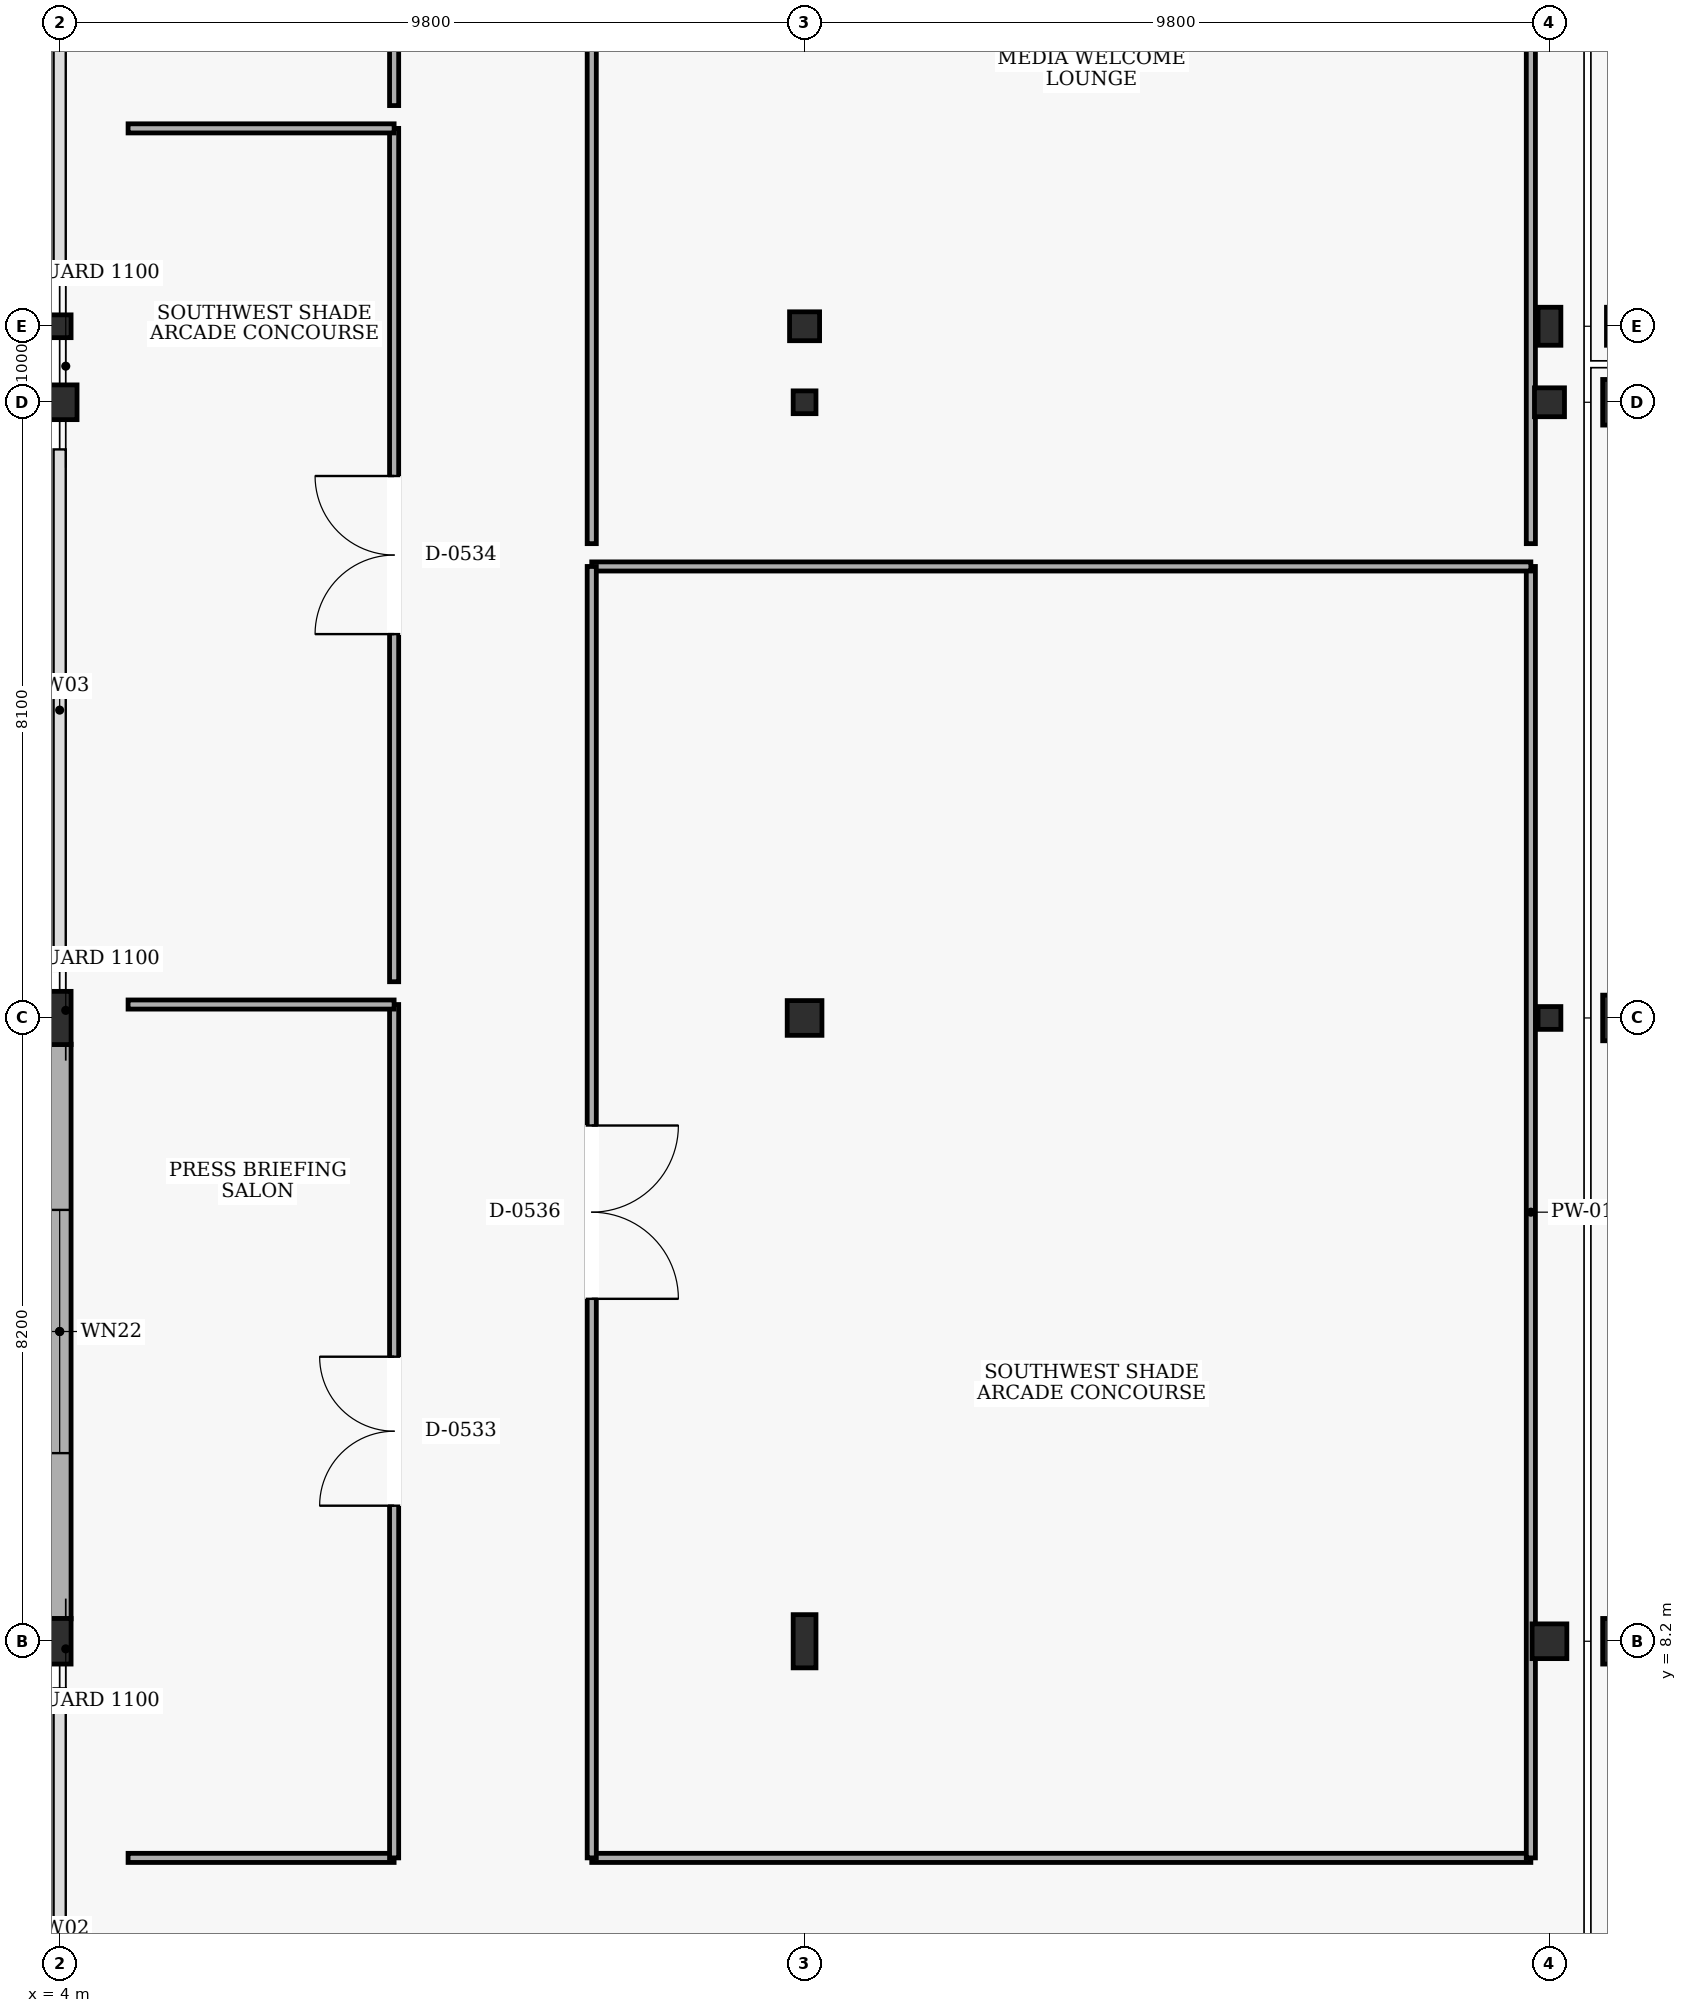
"""IFC4 building model, lengths in metres.
Left out: names, types, materials, properties, quantities, classifications, styles, units other than length and angle.
Written with IfcOpenShell. Run it as: python <this file> out.ifc"""

import sys

from ifc_helpers import new_model, si_unit, direction, frame, frame_2d, origin, origin_2d, place, context, subcontext, project, spatial, rectangle, hollow_rectangle, hollow_circle, i_section, extrude, element, fill, save


model = new_model("IFC4")
c1 = context("Model", 3, precision=1e-05, world=origin(), true_north=direction((0.0, 1.0)))
c2 = subcontext(c1, "Body", "Model", "MODEL_VIEW")
j1 = project(units=[si_unit("LENGTHUNIT", "METRE"), si_unit("PLANEANGLEUNIT", "RADIAN")], contexts=[c1])
p1 = place(None, origin())
s1 = spatial("IfcSite", under=j1, at=p1, CompositionType="ELEMENT")
p2 = place(p1, origin())
s2 = spatial("IfcBuilding", under=s1, at=p2, CompositionType="ELEMENT")
p3 = place(p2, frame((0.0, 0.0, 5.4)))
s3 = spatial("IfcBuildingStorey", under=s2, at=p3, CompositionType="ELEMENT", Elevation=5.4)
p4 = place(p3, frame((4.0, 8.2, 0.0), z_axis=(0.0, 0.0, 1.0), x_axis=(1.0, 0.0, 0.0)))
e1 = element("IfcColumn", 1, at=p4, inside=s3, PredefinedType="COLUMN", context=c2, shape_type="SweptSolid", body=[
    extrude(i_section(OverallWidth=0.3, OverallDepth=0.6, WebThickness=0.015, FlangeThickness=0.03, at=origin_2d()), origin(), (0.0, 0.0, 1.0), 4.8),
])
p5 = place(p3, frame((4.0, 16.4, 0.0), z_axis=(0.0, 0.0, 1.0), x_axis=(1.0, 0.0, 0.0)))
e2 = element("IfcColumn", 2, at=p5, inside=s3, PredefinedType="COLUMN", context=c2, shape_type="SweptSolid", body=[
    extrude(i_section(OverallWidth=0.3, OverallDepth=0.7, WebThickness=0.017, FlangeThickness=0.032, at=origin_2d()), origin(), (0.0, 0.0, 1.0), 4.8),
])
p6 = place(p3, frame((4.0, 24.5, 0.0), z_axis=(0.0, 0.0, 1.0), x_axis=(1.0, 0.0, 0.0)))
e3 = element("IfcColumn", 3, at=p6, inside=s3, PredefinedType="COLUMN", context=c2, shape_type="SweptSolid", body=[
    extrude(hollow_circle(Radius=0.229, WallThickness=0.02, at=origin_2d()), origin(), (0.0, 0.0, 1.0), 4.8),
])
p7 = place(p3, frame((4.0, 25.5, 0.0), z_axis=(0.0, 0.0, 1.0), x_axis=(1.0, 0.0, 0.0)))
e4 = element("IfcColumn", 4, at=p7, inside=s3, PredefinedType="COLUMN", context=c2, shape_type="SweptSolid", body=[
    extrude(hollow_rectangle(XDim=0.3, YDim=0.3, WallThickness=0.016, at=origin_2d()), origin(), (0.0, 0.0, 1.0), 4.8),
])
p8 = place(p3, frame((13.8, 8.2, 0.0), z_axis=(0.0, 0.0, 1.0), x_axis=(1.0, 0.0, 0.0)))
e5 = element("IfcColumn", 5, at=p8, inside=s3, PredefinedType="COLUMN", context=c2, shape_type="SweptSolid", body=[
    extrude(i_section(OverallWidth=0.3, OverallDepth=0.7, WebThickness=0.017, FlangeThickness=0.032, at=origin_2d()), origin(), (0.0, 0.0, 1.0), 4.8),
])
p9 = place(p3, frame((13.8, 16.4, 0.0), z_axis=(0.0, 0.0, 1.0), x_axis=(1.0, 0.0, 0.0)))
e6 = element("IfcColumn", 6, at=p9, inside=s3, PredefinedType="COLUMN", context=c2, shape_type="SweptSolid", body=[
    extrude(hollow_circle(Radius=0.229, WallThickness=0.02, at=origin_2d()), origin(), (0.0, 0.0, 1.0), 4.8),
])
p10 = place(p3, frame((13.8, 24.5, 0.0), z_axis=(0.0, 0.0, 1.0), x_axis=(1.0, 0.0, 0.0)))
e7 = element("IfcColumn", 7, at=p10, inside=s3, PredefinedType="COLUMN", context=c2, shape_type="SweptSolid", body=[
    extrude(hollow_rectangle(XDim=0.3, YDim=0.3, WallThickness=0.016, at=origin_2d()), origin(), (0.0, 0.0, 1.0), 4.8),
])
p11 = place(p3, frame((13.8, 25.5, 0.0), z_axis=(0.0, 0.0, 1.0), x_axis=(1.0, 0.0, 0.0)))
e8 = element("IfcColumn", 8, at=p11, inside=s3, PredefinedType="COLUMN", context=c2, shape_type="SweptSolid", body=[
    extrude(i_section(OverallWidth=0.395, OverallDepth=0.38, WebThickness=0.019, FlangeThickness=0.03, at=origin_2d()), origin(), (0.0, 0.0, 1.0), 4.8),
])
p12 = place(p3, frame((23.6, 8.2, 0.0), z_axis=(0.0, 0.0, 1.0), x_axis=(1.0, 0.0, 0.0)))
e9 = element("IfcColumn", 9, at=p12, inside=s3, PredefinedType="COLUMN", context=c2, shape_type="SweptSolid", body=[
    extrude(hollow_circle(Radius=0.229, WallThickness=0.02, at=origin_2d()), origin(), (0.0, 0.0, 1.0), 4.8),
])
p13 = place(p3, frame((23.6, 16.4, 0.0), z_axis=(0.0, 0.0, 1.0), x_axis=(1.0, 0.0, 0.0)))
e10 = element("IfcColumn", 10, at=p13, inside=s3, PredefinedType="COLUMN", context=c2, shape_type="SweptSolid", body=[
    extrude(hollow_rectangle(XDim=0.3, YDim=0.3, WallThickness=0.016, at=origin_2d()), origin(), (0.0, 0.0, 1.0), 4.8),
])
p14 = place(p3, frame((23.6, 24.5, 0.0), z_axis=(0.0, 0.0, 1.0), x_axis=(1.0, 0.0, 0.0)))
e11 = element("IfcColumn", 11, at=p14, inside=s3, PredefinedType="COLUMN", context=c2, shape_type="SweptSolid", body=[
    extrude(i_section(OverallWidth=0.395, OverallDepth=0.38, WebThickness=0.019, FlangeThickness=0.03, at=origin_2d()), origin(), (0.0, 0.0, 1.0), 4.8),
])
p15 = place(p3, frame((23.6, 25.5, 0.0), z_axis=(0.0, 0.0, 1.0), x_axis=(1.0, 0.0, 0.0)))
e12 = element("IfcColumn", 12, at=p15, inside=s3, PredefinedType="COLUMN", context=c2, shape_type="SweptSolid", body=[
    extrude(i_section(OverallWidth=0.3, OverallDepth=0.5, WebThickness=0.014, FlangeThickness=0.028, at=origin_2d()), origin(), (0.0, 0.0, 1.0), 4.8),
])
for number, where, z_axis, x_axis in (
    (13, (24.6, 8.2, 0.0), (0.0, 0.0, 1.0), (1.0, 0.0, 0.0)),
    (14, (24.6, 16.4, 0.0), (0.0, 0.0, 1.0), (1.0, 0.0, 0.0)),
    (15, (24.6, 24.5, 0.0), (0.0, 0.0, 1.0), (1.0, 0.0, 0.0)),
):
    element("IfcColumn", number, at=place(p3, frame(where, z_axis=z_axis, x_axis=x_axis)), inside=s3, PredefinedType="COLUMN", context=c2, shape_type="SweptSolid", body=[
        extrude(rectangle(XDim=0.6, YDim=0.6, at=origin_2d()), origin(), (0.0, 0.0, 1.0), 4.8),
    ])
p16 = place(p3, frame((24.6, 25.5, 0.0), z_axis=(0.0, 0.0, 1.0), x_axis=(1.0, 0.0, 0.0)))
e16 = element("IfcColumn", 16, at=p16, inside=s3, PredefinedType="COLUMN", context=c2, shape_type="SweptSolid", body=[
    extrude(rectangle(XDim=0.5, YDim=0.5, at=origin_2d()), origin(), (0.0, 0.0, 1.0), 4.8),
])
p17 = place(p3, frame((4.0, 8.495, 0.0), z_axis=(0.0, 0.0, 1.0), x_axis=(0.0, 1.0, 0.0)))
e17 = element("IfcWall", 17, at=p17, inside=s3, PredefinedType="SOLIDWALL", context=c2, shape_type="SweptSolid", body=[
    extrude(rectangle(XDim=7.56, YDim=0.3, at=frame_2d((3.78, 0.0))), origin(), (0.0, 0.0, 1.0), 3.78),
])
p18 = place(p17, frame((2.18, 0.0, 0.9)))
e18 = element("IfcOpeningElement", 18, at=p18, cuts=e17, PredefinedType="OPENING", context=c2, shape_type="SweptSolid", body=[
    extrude(rectangle(XDim=3.2, YDim=2.4, at=frame_2d((1.6, 1.2))), frame((0.0, 0.16, 0.0), z_axis=(0.0, -1.0, 0.0), x_axis=(1.0, 0.0, 0.0)), (0.0, 0.0, 1.0), 0.32),
])
p19 = place(p3, frame((4.9, 5.35, 0.0), z_axis=(0.0, 0.0, 1.0), x_axis=(1.0, 0.0, 0.0)))
e19 = element("IfcWall", 19, at=p19, inside=s3, PredefinedType="PARTITIONING", context=c2, shape_type="SweptSolid", body=[
    extrude(rectangle(XDim=3.5, YDim=0.12, at=frame_2d((1.75, 0.0))), origin(), (0.0, 0.0, 1.0), 4.5),
])
p20 = place(p3, frame((8.4, 5.35, 0.0), z_axis=(0.0, 0.0, 1.0), x_axis=(0.0, 1.0, 0.0)))
e20 = element("IfcWall", 20, at=p20, inside=s3, PredefinedType="PARTITIONING", context=c2, shape_type="SweptSolid", body=[
    extrude(rectangle(XDim=11.227, YDim=0.12, at=frame_2d((5.613, 0.0))), origin(), (0.0, 0.0, 1.0), 4.5),
])
p21 = place(p20, frame((4.633, 0.0, 0.0)))
e21 = element("IfcOpeningElement", 21, at=p21, cuts=e20, PredefinedType="OPENING", context=c2, shape_type="SweptSolid", body=[
    extrude(rectangle(XDim=1.96, YDim=2.3, at=frame_2d((0.98, 1.15))), frame((0.0, 0.07, 0.0), z_axis=(0.0, -1.0, 0.0), x_axis=(1.0, 0.0, 0.0)), (0.0, 0.0, 1.0), 0.14),
])
p22 = place(p3, frame((8.4, 16.577, 0.0), z_axis=(0.0, 0.0, 1.0), x_axis=(-1.0, 0.0, 0.0)))
e22 = element("IfcWall", 22, at=p22, inside=s3, PredefinedType="PARTITIONING", context=c2, shape_type="SweptSolid", body=[
    extrude(rectangle(XDim=3.5, YDim=0.12, at=frame_2d((1.75, 0.0))), origin(), (0.0, 0.0, 1.0), 3.68),
])
p23 = place(p3, frame((8.4, 16.877, 0.0), z_axis=(0.0, 0.0, 1.0), x_axis=(0.0, 1.0, 0.0)))
e23 = element("IfcWall", 23, at=p23, inside=s3, PredefinedType="PARTITIONING", context=c2, shape_type="SweptSolid", body=[
    extrude(rectangle(XDim=11.227, YDim=0.12, at=frame_2d((5.613, 0.0))), origin(), (0.0, 0.0, 1.0), 4.5),
])
p24 = place(p23, frame((4.573, 0.0, 0.0)))
e24 = element("IfcOpeningElement", 24, at=p24, cuts=e23, PredefinedType="OPENING", context=c2, shape_type="SweptSolid", body=[
    extrude(rectangle(XDim=2.08, YDim=2.35, at=frame_2d((1.04, 1.175))), frame((0.0, 0.07, 0.0), z_axis=(0.0, -1.0, 0.0), x_axis=(1.0, 0.0, 0.0)), (0.0, 0.0, 1.0), 0.14),
])
p25 = place(p3, frame((8.4, 28.103, 0.0), z_axis=(0.0, 0.0, 1.0), x_axis=(-1.0, 0.0, 0.0)))
e25 = element("IfcWall", 25, at=p25, inside=s3, PredefinedType="PARTITIONING", context=c2, shape_type="SweptSolid", body=[
    extrude(rectangle(XDim=3.5, YDim=0.12, at=frame_2d((1.75, 0.0))), origin(), (0.0, 0.0, 1.0), 4.5),
])
p26 = place(p3, frame((8.4, 28.403, 0.0), z_axis=(0.0, 0.0, 1.0), x_axis=(0.0, 1.0, 0.0)))
e26 = element("IfcWall", 26, at=p26, inside=s3, PredefinedType="PARTITIONING", context=c2, shape_type="SweptSolid", body=[
    extrude(rectangle(XDim=11.227, YDim=0.12, at=frame_2d((5.613, 0.0))), origin(), (0.0, 0.0, 1.0), 4.5),
])
p27 = place(p26, frame((4.533, 0.0, 0.0)))
e27 = element("IfcOpeningElement", 27, at=p27, cuts=e26, PredefinedType="OPENING", context=c2, shape_type="SweptSolid", body=[
    extrude(rectangle(XDim=2.16, YDim=2.35, at=frame_2d((1.08, 1.175))), frame((0.0, 0.07, 0.0), z_axis=(0.0, -1.0, 0.0), x_axis=(1.0, 0.0, 0.0)), (0.0, 0.0, 1.0), 0.14),
])
p28 = place(p3, frame((11.0, 5.35, 0.0), z_axis=(0.0, 0.0, 1.0), x_axis=(1.0, 0.0, 0.0)))
e28 = element("IfcWall", 28, at=p28, inside=s3, PredefinedType="PARTITIONING", context=c2, shape_type="SweptSolid", body=[
    extrude(rectangle(XDim=12.355, YDim=0.12, at=frame_2d((6.177, 0.0))), origin(), (0.0, 0.0, 1.0), 4.5),
])
p29 = place(p3, frame((23.355, 5.35, 0.0), z_axis=(0.0, 0.0, 1.0), x_axis=(0.0, 1.0, 0.0)))
e29 = element("IfcWall", 29, at=p29, inside=s3, PredefinedType="PARTITIONING", context=c2, shape_type="SweptSolid", body=[
    extrude(rectangle(XDim=16.99, YDim=0.12, at=frame_2d((8.495, 0.0))), origin(), (0.0, 0.0, 1.0), 3.78),
])
p30 = place(p3, frame((23.355, 22.34, 0.0), z_axis=(0.0, 0.0, 1.0), x_axis=(-1.0, 0.0, 0.0)))
e30 = element("IfcWall", 30, at=p30, inside=s3, PredefinedType="PARTITIONING", context=c2, shape_type="SweptSolid", body=[
    extrude(rectangle(XDim=12.355, YDim=0.12, at=frame_2d((6.177, 0.0))), origin(), (0.0, 0.0, 1.0), 4.5),
])
p31 = place(p3, frame((11.0, 22.34, 0.0), z_axis=(0.0, 0.0, 1.0), x_axis=(0.0, -1.0, 0.0)))
e31 = element("IfcWall", 31, at=p31, inside=s3, PredefinedType="PARTITIONING", context=c2, shape_type="SweptSolid", body=[
    extrude(rectangle(XDim=16.99, YDim=0.12, at=frame_2d((8.495, 0.0))), origin(), (0.0, 0.0, 1.0), 4.5),
])
p32 = place(p31, frame((7.355, 0.0, 0.0)))
e32 = element("IfcOpeningElement", 32, at=p32, cuts=e31, PredefinedType="OPENING", context=c2, shape_type="SweptSolid", body=[
    extrude(rectangle(XDim=2.28, YDim=2.4, at=frame_2d((1.14, 1.2))), frame((0.0, 0.07, 0.0), z_axis=(0.0, -1.0, 0.0), x_axis=(1.0, 0.0, 0.0)), (0.0, 0.0, 1.0), 0.14),
])
p33 = place(p3, frame((23.355, 22.64, 0.0), z_axis=(0.0, 0.0, 1.0), x_axis=(0.0, 1.0, 0.0)))
e33 = element("IfcWall", 33, at=p33, inside=s3, PredefinedType="PARTITIONING", context=c2, shape_type="SweptSolid", body=[
    extrude(rectangle(XDim=16.99, YDim=0.12, at=frame_2d((8.495, 0.0))), origin(), (0.0, 0.0, 1.0), 3.78),
])
p34 = place(p3, frame((11.0, 39.63, 0.0), z_axis=(0.0, 0.0, 1.0), x_axis=(0.0, -1.0, 0.0)))
e34 = element("IfcWall", 34, at=p34, inside=s3, PredefinedType="PARTITIONING", context=c2, shape_type="SweptSolid", body=[
    extrude(rectangle(XDim=16.99, YDim=0.12, at=frame_2d((8.495, 0.0))), origin(), (0.0, 0.0, 1.0), 4.5),
])
p35 = place(p34, frame((7.315, 0.0, 0.0)))
e35 = element("IfcOpeningElement", 35, at=p35, cuts=e34, PredefinedType="OPENING", context=c2, shape_type="SweptSolid", body=[
    extrude(rectangle(XDim=2.36, YDim=2.4, at=frame_2d((1.18, 1.2))), frame((0.0, 0.07, 0.0), z_axis=(0.0, -1.0, 0.0), x_axis=(1.0, 0.0, 0.0)), (0.0, 0.0, 1.0), 0.14),
])
p36 = place(p18, origin())
e36 = element("IfcWindow", 36, at=p36, inside=s3, PartitioningType="SINGLE_PANEL", PredefinedType="WINDOW", context=c2, shape_type="SweptSolid", body=[
    extrude(rectangle(XDim=3.2, YDim=2.4, at=frame_2d((1.6, 1.2))), frame((0.0, 0.03, 0.0), z_axis=(0.0, -1.0, 0.0), x_axis=(1.0, 0.0, 0.0)), (0.0, 0.0, 1.0), 0.06),
])
fill(e18, e36)
p37 = place(p21, origin())
e37 = element("IfcDoor", 37, at=p37, inside=s3, OperationType="DOUBLE_DOOR_SINGLE_SWING", PredefinedType="DOOR", context=c2, shape_type="SweptSolid", body=[
    extrude(rectangle(XDim=1.96, YDim=2.3, at=frame_2d((0.98, 1.15))), frame((0.0, 0.025, 0.0), z_axis=(0.0, -1.0, 0.0), x_axis=(1.0, 0.0, 0.0)), (0.0, 0.0, 1.0), 0.05),
])
fill(e21, e37)
p38 = place(p24, origin())
e38 = element("IfcDoor", 38, at=p38, inside=s3, OperationType="DOUBLE_DOOR_SINGLE_SWING", PredefinedType="DOOR", context=c2, shape_type="SweptSolid", body=[
    extrude(rectangle(XDim=2.08, YDim=2.35, at=frame_2d((1.04, 1.175))), frame((0.0, 0.025, 0.0), z_axis=(0.0, -1.0, 0.0), x_axis=(1.0, 0.0, 0.0)), (0.0, 0.0, 1.0), 0.05),
])
fill(e24, e38)
p39 = place(p32, origin())
e39 = element("IfcDoor", 39, at=p39, inside=s3, OperationType="DOUBLE_DOOR_SINGLE_SWING", PredefinedType="DOOR", context=c2, shape_type="SweptSolid", body=[
    extrude(rectangle(XDim=2.28, YDim=2.4, at=frame_2d((1.14, 1.2))), frame((0.0, 0.025, 0.0), z_axis=(0.0, -1.0, 0.0), x_axis=(1.0, 0.0, 0.0)), (0.0, 0.0, 1.0), 0.05),
])
fill(e32, e39)
save(model, sys.argv[1])
